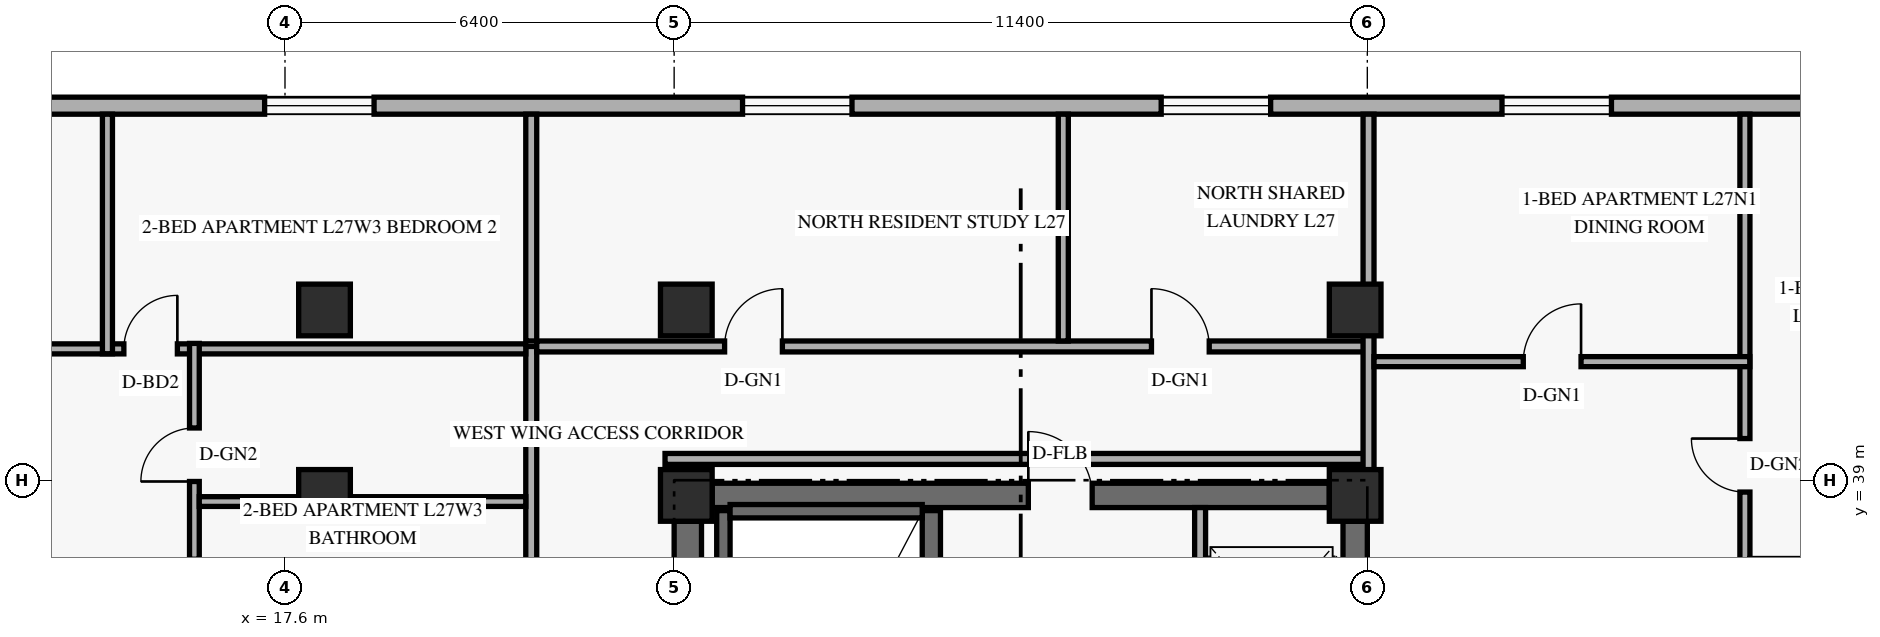
"""IFC4 building model, lengths in metres.
Left out: names, types, materials, properties, quantities, classifications, styles, units other than length and angle.
Written with IfcOpenShell. Run it as: python <this file> out.ifc"""

import sys

from ifc_helpers import new_model, si_unit, direction, frame, frame_2d, origin, origin_2d, place, context, subcontext, project, spatial, rectangle, extrude, element, fill, save


model = new_model("IFC4")
c1 = context("Model", 3, precision=1e-05, world=origin(), true_north=direction((0.0, 1.0)))
c2 = subcontext(c1, "Body", "Model", "MODEL_VIEW")
j1 = project(units=[si_unit("LENGTHUNIT", "METRE"), si_unit("PLANEANGLEUNIT", "RADIAN")], contexts=[c1])
p1 = place(None, origin())
s1 = spatial("IfcSite", under=j1, at=p1, CompositionType="ELEMENT")
p2 = place(p1, origin())
s2 = spatial("IfcBuilding", under=s1, at=p2, CompositionType="ELEMENT")
p3 = place(p2, frame((0.0, 0.0, 106.2)))
s3 = spatial("IfcBuildingStorey", under=s2, at=p3, CompositionType="ELEMENT", Elevation=106.2)
p4 = place(p3, frame((24.225, 30.625, 0.0), z_axis=(0.0, 0.0, 1.0), x_axis=(0.0, 1.0, 0.0)))
e1 = element("IfcWall", 1, at=p4, inside=s3, PredefinedType="SHEAR", context=c2, shape_type="SweptSolid", body=[
    extrude(rectangle(XDim=7.7, YDim=0.45, at=frame_2d((3.85, 0.0))), origin(), (0.0, 0.0, 1.0), 2.749),
])
p5 = place(p3, frame((35.2, 31.35, 0.0), z_axis=(0.0, 0.0, 1.0), x_axis=(0.0, 1.0, 0.0)))
e2 = element("IfcWall", 2, at=p5, inside=s3, PredefinedType="SHEAR", context=c2, shape_type="SweptSolid", body=[
    extrude(rectangle(XDim=6.975, YDim=0.4, at=frame_2d((3.487, 0.0))), origin(), (0.0, 0.0, 1.0), 2.749),
])
p6 = place(p3, frame((24.625, 38.75, 0.0), z_axis=(0.0, 0.0, 1.0), x_axis=(1.0, 0.0, 0.0)))
e3 = element("IfcWall", 3, at=p6, inside=s3, PredefinedType="SHEAR", context=c2, shape_type="SweptSolid", body=[
    extrude(rectangle(XDim=10.15, YDim=0.4, at=frame_2d((5.075, 0.0))), origin(), (0.0, 0.0, 1.0), 3.36),
])
p7 = place(p6, frame((5.2, 0.0, 0.0)))
e4 = element("IfcOpeningElement", 4, at=p7, cuts=e3, PredefinedType="OPENING", context=c2, shape_type="SweptSolid", body=[
    extrude(rectangle(XDim=1.05, YDim=2.15, at=frame_2d((0.525, 1.075))), frame((0.0, 0.21, 0.0), z_axis=(0.0, -1.0, 0.0), x_axis=(1.0, 0.0, 0.0)), (0.0, 0.0, 1.0), 0.42),
])
p8 = place(p3, frame((24.81, 30.74, 0.0), z_axis=(0.0, 0.0, 1.0), x_axis=(0.0, 1.0, 0.0)))
e5 = element("IfcWall", 5, at=p8, inside=s3, PredefinedType="SHEAR", context=c2, shape_type="SweptSolid", body=[
    extrude(rectangle(XDim=7.76, YDim=0.22, at=frame_2d((3.88, 0.0))), origin(), (0.0, 0.0, 1.0), 3.36),
])
p9 = place(p3, frame((28.23, 30.74, 0.0), z_axis=(0.0, 0.0, 1.0), x_axis=(0.0, 1.0, 0.0)))
e6 = element("IfcWall", 6, at=p9, inside=s3, PredefinedType="SHEAR", context=c2, shape_type="SweptSolid", body=[
    extrude(rectangle(XDim=7.76, YDim=0.3, at=frame_2d((3.88, 0.0))), origin(), (0.0, 0.0, 1.0), 3.36),
])
p10 = place(p3, frame((24.92, 38.49, 0.0), z_axis=(0.0, 0.0, 1.0), x_axis=(1.0, 0.0, 0.0)))
e7 = element("IfcWall", 7, at=p10, inside=s3, PredefinedType="SHEAR", context=c2, shape_type="SweptSolid", body=[
    extrude(rectangle(XDim=3.16, YDim=0.22, at=frame_2d((1.58, 0.0))), origin(), (0.0, 0.0, 1.0), 3.36),
])
for number, where, z_axis, x_axis in (
    (8, (18.25, 38.75, 0.0), (0.0, 0.0, 1.0), (1.0, 0.0, 0.0)),
    (9, (18.25, 41.8, 0.0), (0.0, 0.0, 1.0), (1.0, 0.0, 0.0)),
    (10, (24.2, 38.75, 0.0), (0.0, 0.0, 1.0), (1.0, 0.0, 0.0)),
    (11, (24.2, 41.8, 0.0), (0.0, 0.0, 1.0), (1.0, 0.0, 0.0)),
    (12, (35.2, 38.75, 0.0), (0.0, 0.0, 1.0), (1.0, 0.0, 0.0)),
    (13, (35.2, 41.8, 0.0), (0.0, 0.0, 1.0), (1.0, 0.0, 0.0)),
):
    element("IfcColumn", number, at=place(p3, frame(where, z_axis=z_axis, x_axis=x_axis)), inside=s3, PredefinedType="COLUMN", context=c2, shape_type="SweptSolid", body=[
        extrude(rectangle(XDim=0.85, YDim=0.85, at=origin_2d()), origin(), (0.0, 0.0, 1.0), 3.6),
    ])
p11 = place(p3, frame((49.98, 45.16, 0.0), z_axis=(0.0, 0.0, 1.0), x_axis=(-1.0, 0.0, 0.0)))
e14 = element("IfcWall", 14, at=p11, inside=s3, PredefinedType="SOLIDWALL", context=c2, shape_type="SweptSolid", body=[
    extrude(rectangle(XDim=36.56, YDim=0.28, at=frame_2d((18.28, 0.0))), origin(), (0.0, 0.0, 1.0), 3.36),
])
p12 = place(p11, frame((30.915, 0.0, 0.85)))
e15 = element("IfcOpeningElement", 15, at=p12, cuts=e14, PredefinedType="OPENING", context=c2, shape_type="SweptSolid", body=[
    extrude(rectangle(XDim=1.8, YDim=1.6, at=frame_2d((0.9, 0.8))), frame((0.0, 0.15, 0.0), z_axis=(0.0, -1.0, 0.0), x_axis=(1.0, 0.0, 0.0)), (0.0, 0.0, 1.0), 0.3),
])
p13 = place(p11, frame((23.055, 0.0, 0.85)))
e16 = element("IfcOpeningElement", 16, at=p13, cuts=e14, PredefinedType="OPENING", context=c2, shape_type="SweptSolid", body=[
    extrude(rectangle(XDim=1.8, YDim=1.6, at=frame_2d((0.9, 0.8))), frame((0.0, 0.15, 0.0), z_axis=(0.0, -1.0, 0.0), x_axis=(1.0, 0.0, 0.0)), (0.0, 0.0, 1.0), 0.3),
])
p14 = place(p11, frame((16.17, 0.0, 0.85)))
e17 = element("IfcOpeningElement", 17, at=p14, cuts=e14, PredefinedType="OPENING", context=c2, shape_type="SweptSolid", body=[
    extrude(rectangle(XDim=1.8, YDim=1.6, at=frame_2d((0.9, 0.8))), frame((0.0, 0.15, 0.0), z_axis=(0.0, -1.0, 0.0), x_axis=(1.0, 0.0, 0.0)), (0.0, 0.0, 1.0), 0.3),
])
p15 = place(p11, frame((10.565, 0.0, 0.85)))
e18 = element("IfcOpeningElement", 18, at=p15, cuts=e14, PredefinedType="OPENING", context=c2, shape_type="SweptSolid", body=[
    extrude(rectangle(XDim=1.8, YDim=1.6, at=frame_2d((0.9, 0.8))), frame((0.0, 0.15, 0.0), z_axis=(0.0, -1.0, 0.0), x_axis=(1.0, 0.0, 0.0)), (0.0, 0.0, 1.0), 0.3),
])
p16 = place(p11, frame((5.475, 0.0, 0.85)))
e19 = element("IfcOpeningElement", 19, at=p16, cuts=e14, PredefinedType="OPENING", context=c2, shape_type="SweptSolid", body=[
    extrude(rectangle(XDim=1.8, YDim=1.6, at=frame_2d((0.9, 0.8))), frame((0.0, 0.15, 0.0), z_axis=(0.0, -1.0, 0.0), x_axis=(1.0, 0.0, 0.0)), (0.0, 0.0, 1.0), 0.3),
])
p17 = place(p11, frame((2.88, 0.0, 0.85)))
e20 = element("IfcOpeningElement", 20, at=p17, cuts=e14, PredefinedType="OPENING", context=c2, shape_type="SweptSolid", body=[
    extrude(rectangle(XDim=1.2, YDim=1.5, at=frame_2d((0.6, 0.75))), frame((0.0, 0.15, 0.0), z_axis=(0.0, -1.0, 0.0), x_axis=(1.0, 0.0, 0.0)), (0.0, 0.0, 1.0), 0.3),
])
p18 = place(p11, frame((0.39, 0.0, 0.85)))
e21 = element("IfcOpeningElement", 21, at=p18, cuts=e14, PredefinedType="OPENING", context=c2, shape_type="SweptSolid", body=[
    extrude(rectangle(XDim=1.8, YDim=1.6, at=frame_2d((0.9, 0.8))), frame((0.0, 0.15, 0.0), z_axis=(0.0, -1.0, 0.0), x_axis=(1.0, 0.0, 0.0)), (0.0, 0.0, 1.0), 0.3),
])
p19 = place(p3, frame((32.65, 31.35, 0.0), z_axis=(0.0, 0.0, 1.0), x_axis=(0.0, 1.0, 0.0)))
e22 = element("IfcWall", 22, at=p19, inside=s3, PredefinedType="STANDARD", context=c2, shape_type="SweptSolid", body=[
    extrude(rectangle(XDim=7.2, YDim=0.18, at=frame_2d((3.6, 0.0))), origin(), (0.0, 0.0, 1.0), 3.36),
])
p20 = place(p19, frame((0.52, 0.0, 0.0)))
e23 = element("IfcOpeningElement", 23, at=p20, cuts=e22, PredefinedType="OPENING", context=c2, shape_type="SweptSolid", body=[
    extrude(rectangle(XDim=1.05, YDim=2.2, at=frame_2d((0.525, 1.1))), frame((0.0, 0.1, 0.0), z_axis=(0.0, -1.0, 0.0), x_axis=(1.0, 0.0, 0.0)), (0.0, 0.0, 1.0), 0.2),
])
p21 = place(p19, frame((2.67, 0.0, 0.0)))
e24 = element("IfcOpeningElement", 24, at=p21, cuts=e22, PredefinedType="OPENING", context=c2, shape_type="SweptSolid", body=[
    extrude(rectangle(XDim=1.05, YDim=2.2, at=frame_2d((0.525, 1.1))), frame((0.0, 0.1, 0.0), z_axis=(0.0, -1.0, 0.0), x_axis=(1.0, 0.0, 0.0)), (0.0, 0.0, 1.0), 0.2),
])
p22 = place(p19, frame((4.82, 0.0, 0.0)))
e25 = element("IfcOpeningElement", 25, at=p22, cuts=e22, PredefinedType="OPENING", context=c2, shape_type="SweptSolid", body=[
    extrude(rectangle(XDim=1.05, YDim=2.2, at=frame_2d((0.525, 1.1))), frame((0.0, 0.1, 0.0), z_axis=(0.0, -1.0, 0.0), x_axis=(1.0, 0.0, 0.0)), (0.0, 0.0, 1.0), 0.2),
])
p23 = place(p3, frame((21.65, 6.8, 0.0), z_axis=(0.0, 0.0, 1.0), x_axis=(0.0, 1.0, 0.0)))
e26 = element("IfcWall", 26, at=p23, inside=s3, PredefinedType="STANDARD", context=c2, shape_type="SweptSolid", body=[
    extrude(rectangle(XDim=34.4, YDim=0.18, at=frame_2d((17.2, 0.0))), origin(), (0.0, 0.0, 1.0), 2.731),
])
p24 = place(p23, frame((4.785, 0.0, 0.0)))
e27 = element("IfcOpeningElement", 27, at=p24, cuts=e26, PredefinedType="OPENING", context=c2, shape_type="SweptSolid", body=[
    extrude(rectangle(XDim=0.92, YDim=2.15, at=frame_2d((0.46, 1.075))), frame((0.0, 0.1, 0.0), z_axis=(0.0, -1.0, 0.0), x_axis=(1.0, 0.0, 0.0)), (0.0, 0.0, 1.0), 0.2),
])
p25 = place(p23, frame((15.384, 0.0, 0.0)))
e28 = element("IfcOpeningElement", 28, at=p25, cuts=e26, PredefinedType="OPENING", context=c2, shape_type="SweptSolid", body=[
    extrude(rectangle(XDim=0.92, YDim=2.15, at=frame_2d((0.46, 1.075))), frame((0.0, 0.1, 0.0), z_axis=(0.0, -1.0, 0.0), x_axis=(1.0, 0.0, 0.0)), (0.0, 0.0, 1.0), 0.2),
])
p26 = place(p23, frame((28.41, 0.0, 0.0)))
e29 = element("IfcOpeningElement", 29, at=p26, cuts=e26, PredefinedType="OPENING", context=c2, shape_type="SweptSolid", body=[
    extrude(rectangle(XDim=0.92, YDim=2.15, at=frame_2d((0.46, 1.075))), frame((0.0, 0.1, 0.0), z_axis=(0.0, -1.0, 0.0), x_axis=(1.0, 0.0, 0.0)), (0.0, 0.0, 1.0), 0.2),
])
p27 = place(p3, frame((21.74, 41.2, 0.0), z_axis=(0.0, 0.0, 1.0), x_axis=(1.0, 0.0, 0.0)))
e30 = element("IfcWall", 30, at=p27, inside=s3, PredefinedType="STANDARD", context=c2, shape_type="SweptSolid", body=[
    extrude(rectangle(XDim=13.68, YDim=0.18, at=frame_2d((6.84, 0.0))), origin(), (0.0, 0.0, 1.0), 2.731),
])
p28 = place(p27, frame((3.09, 0.0, 0.0)))
e31 = element("IfcOpeningElement", 31, at=p28, cuts=e30, PredefinedType="OPENING", context=c2, shape_type="SweptSolid", body=[
    extrude(rectangle(XDim=0.95, YDim=2.15, at=frame_2d((0.475, 1.075))), frame((0.0, 0.1, 0.0), z_axis=(0.0, -1.0, 0.0), x_axis=(1.0, 0.0, 0.0)), (0.0, 0.0, 1.0), 0.2),
])
p29 = place(p27, frame((10.11, 0.0, 0.0)))
e32 = element("IfcOpeningElement", 32, at=p29, cuts=e30, PredefinedType="OPENING", context=c2, shape_type="SweptSolid", body=[
    extrude(rectangle(XDim=0.95, YDim=2.15, at=frame_2d((0.475, 1.075))), frame((0.0, 0.1, 0.0), z_axis=(0.0, -1.0, 0.0), x_axis=(1.0, 0.0, 0.0)), (0.0, 0.0, 1.0), 0.2),
])
p30 = place(p3, frame((23.85, 39.35, 0.0), z_axis=(0.0, 0.0, 1.0), x_axis=(1.0, 0.0, 0.0)))
e33 = element("IfcWall", 33, at=p30, inside=s3, PredefinedType="STANDARD", context=c2, shape_type="SweptSolid", body=[
    extrude(rectangle(XDim=11.57, YDim=0.18, at=frame_2d((5.785, 0.0))), origin(), (0.0, 0.0, 1.0), 2.731),
])
p31 = place(p3, frame((21.65, 41.29, 0.0), z_axis=(0.0, 0.0, 1.0), x_axis=(0.0, 1.0, 0.0)))
e34 = element("IfcWall", 34, at=p31, inside=s3, PredefinedType="PARTITIONING", context=c2, shape_type="SweptSolid", body=[
    extrude(rectangle(XDim=3.73, YDim=0.18, at=frame_2d((1.865, 0.0))), origin(), (0.0, 0.0, 1.0), 2.809),
])
p32 = place(p3, frame((35.42, 38.75, 0.0), z_axis=(0.0, 0.0, 1.0), x_axis=(0.0, 1.0, 0.0)))
e35 = element("IfcWall", 35, at=p32, inside=s3, PredefinedType="PARTITIONING", context=c2, shape_type="SweptSolid", body=[
    extrude(rectangle(XDim=6.27, YDim=0.18, at=frame_2d((3.135, 0.0))), origin(), (0.0, 0.0, 1.0), 2.731),
])
p33 = place(p3, frame((41.61, 29.55, 0.0), z_axis=(0.0, 0.0, 1.0), x_axis=(0.0, 1.0, 0.0)))
e36 = element("IfcWall", 36, at=p33, inside=s3, PredefinedType="PARTITIONING", context=c2, shape_type="SweptSolid", body=[
    extrude(rectangle(XDim=15.47, YDim=0.165, at=frame_2d((7.735, 0.0))), origin(), (0.0, 0.0, 1.0), 2.731),
])
p34 = place(p33, frame((4.917, 0.0, 0.0)))
e37 = element("IfcOpeningElement", 37, at=p34, cuts=e36, PredefinedType="OPENING", context=c2, shape_type="SweptSolid", body=[
    extrude(rectangle(XDim=0.88, YDim=2.14, at=frame_2d((0.44, 1.07))), frame((0.0, 0.093, 0.0), z_axis=(0.0, -1.0, 0.0), x_axis=(1.0, 0.0, 0.0)), (0.0, 0.0, 1.0), 0.185),
])
p35 = place(p33, frame((9.255, 0.0, 0.0)))
e38 = element("IfcOpeningElement", 38, at=p35, cuts=e36, PredefinedType="OPENING", context=c2, shape_type="SweptSolid", body=[
    extrude(rectangle(XDim=0.88, YDim=2.12, at=frame_2d((0.44, 1.06))), frame((0.0, 0.093, 0.0), z_axis=(0.0, -1.0, 0.0), x_axis=(1.0, 0.0, 0.0)), (0.0, 0.0, 1.0), 0.185),
])
p36 = place(p3, frame((35.51, 40.95, 0.0), z_axis=(0.0, 0.0, 1.0), x_axis=(1.0, 0.0, 0.0)))
e39 = element("IfcWall", 39, at=p36, inside=s3, PredefinedType="PARTITIONING", context=c2, shape_type="SweptSolid", body=[
    extrude(rectangle(XDim=6.18, YDim=0.165, at=frame_2d((3.09, 0.0))), origin(), (0.0, 0.0, 1.0), 3.36),
])
p37 = place(p36, frame((2.455, 0.0, 0.0)))
e40 = element("IfcOpeningElement", 40, at=p37, cuts=e39, PredefinedType="OPENING", context=c2, shape_type="SweptSolid", body=[
    extrude(rectangle(XDim=0.95, YDim=2.15, at=frame_2d((0.475, 1.075))), frame((0.0, 0.093, 0.0), z_axis=(0.0, -1.0, 0.0), x_axis=(1.0, 0.0, 0.0)), (0.0, 0.0, 1.0), 0.185),
])
p38 = place(p3, frame((10.08, 41.16, 0.0), z_axis=(0.0, 0.0, 1.0), x_axis=(1.0, 0.0, 0.0)))
e41 = element("IfcWall", 41, at=p38, inside=s3, PredefinedType="PARTITIONING", context=c2, shape_type="SweptSolid", body=[
    extrude(rectangle(XDim=11.48, YDim=0.165, at=frame_2d((5.74, 0.0))), origin(), (0.0, 0.0, 1.0), 2.731),
])
p39 = place(p38, frame((1.75, 0.0, 0.0)))
e42 = element("IfcOpeningElement", 42, at=p39, cuts=e41, PredefinedType="OPENING", context=c2, shape_type="SweptSolid", body=[
    extrude(rectangle(XDim=0.88, YDim=2.14, at=frame_2d((0.44, 1.07))), frame((0.0, 0.093, 0.0), z_axis=(0.0, -1.0, 0.0), x_axis=(1.0, 0.0, 0.0)), (0.0, 0.0, 1.0), 0.185),
])
p40 = place(p38, frame((4.87, 0.0, 0.0)))
e43 = element("IfcOpeningElement", 43, at=p40, cuts=e41, PredefinedType="OPENING", context=c2, shape_type="SweptSolid", body=[
    extrude(rectangle(XDim=0.88, YDim=2.14, at=frame_2d((0.44, 1.07))), frame((0.0, 0.093, 0.0), z_axis=(0.0, -1.0, 0.0), x_axis=(1.0, 0.0, 0.0)), (0.0, 0.0, 1.0), 0.185),
])
p41 = place(p3, frame((16.11, 36.42, 0.0), z_axis=(0.0, 0.0, 1.0), x_axis=(0.0, 1.0, 0.0)))
e44 = element("IfcWall", 44, at=p41, inside=s3, PredefinedType="PLUMBINGWALL", context=c2, shape_type="SweptSolid", body=[
    extrude(rectangle(XDim=4.83, YDim=0.16, at=frame_2d((2.415, 0.0))), origin(), (0.0, 0.0, 1.0), 2.731),
])
p42 = place(p41, frame((0.42, 0.0, 0.0)))
e45 = element("IfcOpeningElement", 45, at=p42, cuts=e44, PredefinedType="OPENING", context=c2, shape_type="SweptSolid", body=[
    extrude(rectangle(XDim=0.86, YDim=2.12, at=frame_2d((0.43, 1.06))), frame((0.0, 0.09, 0.0), z_axis=(0.0, -1.0, 0.0), x_axis=(1.0, 0.0, 0.0)), (0.0, 0.0, 1.0), 0.18),
])
p43 = place(p41, frame((2.559, 0.0, 0.0)))
e46 = element("IfcOpeningElement", 46, at=p43, cuts=e44, PredefinedType="OPENING", context=c2, shape_type="SweptSolid", body=[
    extrude(rectangle(XDim=0.88, YDim=2.12, at=frame_2d((0.44, 1.06))), frame((0.0, 0.09, 0.0), z_axis=(0.0, -1.0, 0.0), x_axis=(1.0, 0.0, 0.0)), (0.0, 0.0, 1.0), 0.18),
])
p44 = place(p3, frame((16.19, 38.649, 0.0), z_axis=(0.0, 0.0, 1.0), x_axis=(1.0, 0.0, 0.0)))
e47 = element("IfcWall", 47, at=p44, inside=s3, PredefinedType="PLUMBINGWALL", context=c2, shape_type="SweptSolid", body=[
    extrude(rectangle(XDim=5.37, YDim=0.16, at=frame_2d((2.685, 0.0))), origin(), (0.0, 0.0, 1.0), 2.731),
])
p45 = place(p3, frame((14.68, 41.08, 0.0), z_axis=(0.0, 0.0, 1.0), x_axis=(0.0, 1.0, 0.0)))
e48 = element("IfcWall", 48, at=p45, inside=s3, PredefinedType="PARTITIONING", context=c2, shape_type="SweptSolid", body=[
    extrude(rectangle(XDim=3.94, YDim=0.165, at=frame_2d((1.97, 0.0))), origin(), (0.0, 0.0, 1.0), 2.809),
])
p46 = place(p3, frame((30.4, 41.29, 0.0), z_axis=(0.0, 0.0, 1.0), x_axis=(0.0, 1.0, 0.0)))
e49 = element("IfcWall", 49, at=p46, inside=s3, PredefinedType="PARTITIONING", context=c2, shape_type="SweptSolid", body=[
    extrude(rectangle(XDim=3.73, YDim=0.165, at=frame_2d((1.865, 0.0))), origin(), (0.0, 0.0, 1.0), 2.809),
])
p47 = place(p12, origin())
e50 = element("IfcWindow", 50, at=p47, inside=s3, PartitioningType="SINGLE_PANEL", PredefinedType="WINDOW", context=c2, shape_type="SweptSolid", body=[
    extrude(rectangle(XDim=1.8, YDim=1.6, at=frame_2d((0.9, 0.8))), frame((0.0, 0.03, 0.0), z_axis=(0.0, -1.0, 0.0), x_axis=(1.0, 0.0, 0.0)), (0.0, 0.0, 1.0), 0.06),
])
fill(e15, e50)
p48 = place(p13, origin())
e51 = element("IfcWindow", 51, at=p48, inside=s3, PartitioningType="SINGLE_PANEL", PredefinedType="WINDOW", context=c2, shape_type="SweptSolid", body=[
    extrude(rectangle(XDim=1.8, YDim=1.6, at=frame_2d((0.9, 0.8))), frame((0.0, 0.03, 0.0), z_axis=(0.0, -1.0, 0.0), x_axis=(1.0, 0.0, 0.0)), (0.0, 0.0, 1.0), 0.06),
])
fill(e16, e51)
p49 = place(p14, origin())
e52 = element("IfcWindow", 52, at=p49, inside=s3, PartitioningType="SINGLE_PANEL", PredefinedType="WINDOW", context=c2, shape_type="SweptSolid", body=[
    extrude(rectangle(XDim=1.8, YDim=1.6, at=frame_2d((0.9, 0.8))), frame((0.0, 0.03, 0.0), z_axis=(0.0, -1.0, 0.0), x_axis=(1.0, 0.0, 0.0)), (0.0, 0.0, 1.0), 0.06),
])
fill(e17, e52)
p50 = place(p15, origin())
e53 = element("IfcWindow", 53, at=p50, inside=s3, PartitioningType="SINGLE_PANEL", PredefinedType="WINDOW", context=c2, shape_type="SweptSolid", body=[
    extrude(rectangle(XDim=1.8, YDim=1.6, at=frame_2d((0.9, 0.8))), frame((0.0, 0.03, 0.0), z_axis=(0.0, -1.0, 0.0), x_axis=(1.0, 0.0, 0.0)), (0.0, 0.0, 1.0), 0.06),
])
fill(e18, e53)
p51 = place(p7, frame((1.05, 0.0, 0.0), z_axis=(0.0, 0.0, 1.0), x_axis=(-1.0, 0.0, 0.0)))
e54 = element("IfcDoor", 54, at=p51, inside=s3, OperationType="SINGLE_SWING_RIGHT", PredefinedType="DOOR", context=c2, shape_type="SweptSolid", body=[
    extrude(rectangle(XDim=1.05, YDim=2.15, at=frame_2d((0.525, 1.075))), frame((0.0, 0.025, 0.0), z_axis=(0.0, -1.0, 0.0), x_axis=(1.0, 0.0, 0.0)), (0.0, 0.0, 1.0), 0.05),
])
fill(e4, e54)
p52 = place(p37, origin())
e55 = element("IfcDoor", 55, at=p52, inside=s3, OperationType="SINGLE_SWING_RIGHT", PredefinedType="DOOR", context=c2, shape_type="SweptSolid", body=[
    extrude(rectangle(XDim=0.95, YDim=2.15, at=frame_2d((0.475, 1.075))), frame((0.0, 0.025, 0.0), z_axis=(0.0, -1.0, 0.0), x_axis=(1.0, 0.0, 0.0)), (0.0, 0.0, 1.0), 0.05),
])
fill(e40, e55)
p53 = place(p35, origin())
e56 = element("IfcDoor", 56, at=p53, inside=s3, OperationType="SINGLE_SWING_RIGHT", PredefinedType="DOOR", context=c2, shape_type="SweptSolid", body=[
    extrude(rectangle(XDim=0.88, YDim=2.12, at=frame_2d((0.44, 1.06))), frame((0.0, 0.025, 0.0), z_axis=(0.0, -1.0, 0.0), x_axis=(1.0, 0.0, 0.0)), (0.0, 0.0, 1.0), 0.05),
])
fill(e38, e56)
p54 = place(p43, origin())
e57 = element("IfcDoor", 57, at=p54, inside=s3, OperationType="SINGLE_SWING_LEFT", PredefinedType="DOOR", context=c2, shape_type="SweptSolid", body=[
    extrude(rectangle(XDim=0.88, YDim=2.12, at=frame_2d((0.44, 1.06))), frame((0.0, 0.025, 0.0), z_axis=(0.0, -1.0, 0.0), x_axis=(1.0, 0.0, 0.0)), (0.0, 0.0, 1.0), 0.05),
])
fill(e46, e57)
p55 = place(p40, origin())
e58 = element("IfcDoor", 58, at=p55, inside=s3, OperationType="SINGLE_SWING_RIGHT", PredefinedType="DOOR", context=c2, shape_type="SweptSolid", body=[
    extrude(rectangle(XDim=0.88, YDim=2.14, at=frame_2d((0.44, 1.07))), frame((0.0, 0.025, 0.0), z_axis=(0.0, -1.0, 0.0), x_axis=(1.0, 0.0, 0.0)), (0.0, 0.0, 1.0), 0.05),
])
fill(e43, e58)
p56 = place(p28, origin())
e59 = element("IfcDoor", 59, at=p56, inside=s3, OperationType="SINGLE_SWING_RIGHT", PredefinedType="DOOR", context=c2, shape_type="SweptSolid", body=[
    extrude(rectangle(XDim=0.95, YDim=2.15, at=frame_2d((0.475, 1.075))), frame((0.0, 0.025, 0.0), z_axis=(0.0, -1.0, 0.0), x_axis=(1.0, 0.0, 0.0)), (0.0, 0.0, 1.0), 0.05),
])
fill(e31, e59)
p57 = place(p29, origin())
e60 = element("IfcDoor", 60, at=p57, inside=s3, OperationType="SINGLE_SWING_LEFT", PredefinedType="DOOR", context=c2, shape_type="SweptSolid", body=[
    extrude(rectangle(XDim=0.95, YDim=2.15, at=frame_2d((0.475, 1.075))), frame((0.0, 0.025, 0.0), z_axis=(0.0, -1.0, 0.0), x_axis=(1.0, 0.0, 0.0)), (0.0, 0.0, 1.0), 0.05),
])
fill(e32, e60)
save(model, sys.argv[1])
